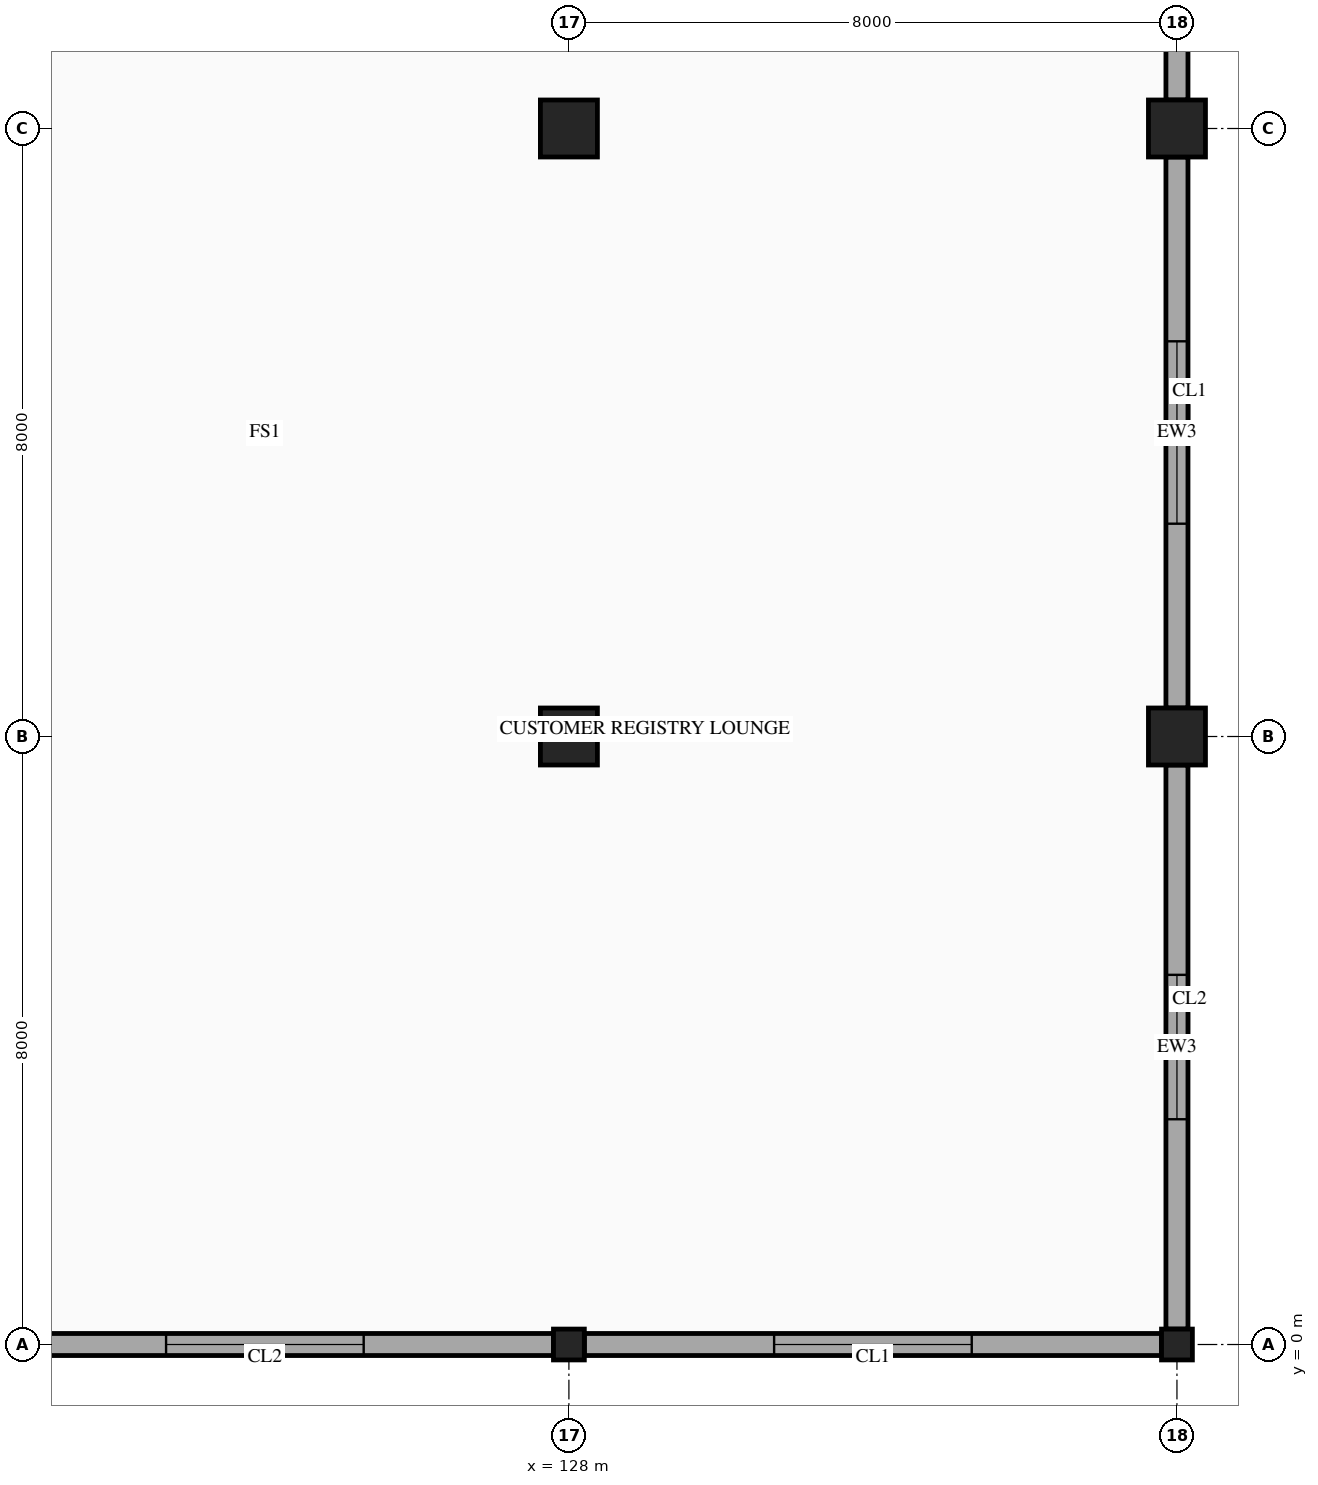
"""IFC4 building model, lengths in metres.
Left out: names, types, materials, properties, quantities, classifications, styles, units other than length and angle.
Written with IfcOpenShell. Run it as: python <this file> out.ifc"""

import sys

from ifc_helpers import new_model, si_unit, direction, frame, frame_2d, origin, origin_2d, place, context, subcontext, project, spatial, rectangle, hollow_rectangle, extrude, element, fill, save


model = new_model("IFC4")
c1 = context("Model", 3, precision=1e-05, world=origin(), true_north=direction((0.0, 1.0)))
c2 = subcontext(c1, "Body", "Model", "MODEL_VIEW")
j1 = project(units=[si_unit("LENGTHUNIT", "METRE"), si_unit("PLANEANGLEUNIT", "RADIAN")], contexts=[c1])
p1 = place(None, origin())
s1 = spatial("IfcSite", under=j1, at=p1, CompositionType="ELEMENT")
p2 = place(p1, origin())
s2 = spatial("IfcBuilding", under=s1, at=p2, CompositionType="ELEMENT")
p3 = place(p2, frame((0.0, 0.0, 23.9)))
s3 = spatial("IfcBuildingStorey", under=s2, at=p3, CompositionType="ELEMENT", Elevation=23.9)
p4 = place(p3, frame((128.0, 0.0, 0.0), z_axis=(0.0, 0.0, 1.0), x_axis=(1.0, 0.0, 0.0)))
e1 = element("IfcColumn", 1, at=p4, inside=s3, PredefinedType="COLUMN", context=c2, shape_type="SweptSolid", body=[
    extrude(hollow_rectangle(XDim=0.406, YDim=0.406, WallThickness=0.015, InnerFilletRadius=0.015, OuterFilletRadius=0.029, at=origin_2d()), origin(), (0.0, 0.0, 1.0), 4.5),
])
for number, where, z_axis, x_axis in (
    (2, (128.0, 8.0, 0.0), (0.0, 0.0, 1.0), (1.0, 0.0, 0.0)),
    (3, (128.0, 16.0, 0.0), (0.0, 0.0, 1.0), (1.0, 0.0, 0.0)),
):
    element("IfcColumn", number, at=place(p3, frame(where, z_axis=z_axis, x_axis=x_axis)), inside=s3, PredefinedType="COLUMN", context=c2, shape_type="SweptSolid", body=[
        extrude(rectangle(XDim=0.75, YDim=0.75, at=origin_2d()), origin(), (0.0, 0.0, 1.0), 4.5),
    ])
p5 = place(p3, frame((136.0, 0.0, 0.0), z_axis=(0.0, 0.0, 1.0), x_axis=(1.0, 0.0, 0.0)))
e4 = element("IfcColumn", 4, at=p5, inside=s3, PredefinedType="COLUMN", context=c2, shape_type="SweptSolid", body=[
    extrude(hollow_rectangle(XDim=0.406, YDim=0.406, WallThickness=0.015, InnerFilletRadius=0.015, OuterFilletRadius=0.029, at=origin_2d()), origin(), (0.0, 0.0, 1.0), 4.5),
])
for number, where, z_axis, x_axis in (
    (5, (136.0, 8.0, 0.0), (0.0, 0.0, 1.0), (1.0, 0.0, 0.0)),
    (6, (136.0, 16.0, 0.0), (0.0, 0.0, 1.0), (1.0, 0.0, 0.0)),
):
    element("IfcColumn", number, at=place(p3, frame(where, z_axis=z_axis, x_axis=x_axis)), inside=s3, PredefinedType="COLUMN", context=c2, shape_type="SweptSolid", body=[
        extrude(rectangle(XDim=0.75, YDim=0.75, at=origin_2d()), origin(), (0.0, 0.0, 1.0), 4.5),
    ])
p6 = place(p3, frame((136.0, 23.675, 0.0), z_axis=(0.0, 0.0, 1.0), x_axis=(0.0, -1.0, 0.0)))
e7 = element("IfcWall", 7, at=p6, inside=s3, PredefinedType="STANDARD", context=c2, shape_type="SweptSolid", body=[
    extrude(rectangle(XDim=7.3, YDim=0.29, at=frame_2d((3.65, 0.0))), origin(), (0.0, 0.0, 1.0), 3.48),
])
p7 = place(p3, frame((136.0, 15.625, 0.0), z_axis=(0.0, 0.0, 1.0), x_axis=(0.0, -1.0, 0.0)))
e8 = element("IfcWall", 8, at=p7, inside=s3, PredefinedType="STANDARD", context=c2, shape_type="SweptSolid", body=[
    extrude(rectangle(XDim=7.25, YDim=0.29, at=frame_2d((3.625, 0.0))), origin(), (0.0, 0.0, 1.0), 3.48),
])
p8 = place(p7, frame((2.425, 0.0, 0.8)))
e9 = element("IfcOpeningElement", 9, at=p8, cuts=e8, PredefinedType="OPENING", context=c2, shape_type="SweptSolid", body=[
    extrude(rectangle(XDim=2.4, YDim=1.8, at=frame_2d((1.2, 0.9))), frame((0.0, 0.155, 0.0), z_axis=(0.0, -1.0, 0.0), x_axis=(1.0, 0.0, 0.0)), (0.0, 0.0, 1.0), 0.31),
])
p9 = place(p3, frame((136.0, 7.625, 0.0), z_axis=(0.0, 0.0, 1.0), x_axis=(0.0, -1.0, 0.0)))
e10 = element("IfcWall", 10, at=p9, inside=s3, PredefinedType="STANDARD", context=c2, shape_type="SweptSolid", body=[
    extrude(rectangle(XDim=7.422, YDim=0.29, at=frame_2d((3.711, 0.0))), origin(), (0.0, 0.0, 1.0), 3.48),
])
p10 = place(p9, frame((2.761, 0.0, 0.8)))
e11 = element("IfcOpeningElement", 11, at=p10, cuts=e10, PredefinedType="OPENING", context=c2, shape_type="SweptSolid", body=[
    extrude(rectangle(XDim=1.9, YDim=1.85, at=frame_2d((0.95, 0.925))), frame((0.0, 0.155, 0.0), z_axis=(0.0, -1.0, 0.0), x_axis=(1.0, 0.0, 0.0)), (0.0, 0.0, 1.0), 0.31),
])
p11 = place(p3, frame((135.797, 0.0, 0.0), z_axis=(0.0, 0.0, 1.0), x_axis=(-1.0, 0.0, 0.0)))
e12 = element("IfcWall", 12, at=p11, inside=s3, PredefinedType="STANDARD", context=c2, shape_type="SweptSolid", body=[
    extrude(rectangle(XDim=7.594, YDim=0.29, at=frame_2d((3.797, 0.0))), origin(), (0.0, 0.0, 1.0), 3.48),
])
p12 = place(p11, frame((2.497, 0.0, 0.8)))
e13 = element("IfcOpeningElement", 13, at=p12, cuts=e12, PredefinedType="OPENING", context=c2, shape_type="SweptSolid", body=[
    extrude(rectangle(XDim=2.6, YDim=1.3, at=frame_2d((1.3, 0.65))), frame((0.0, 0.155, 0.0), z_axis=(0.0, -1.0, 0.0), x_axis=(1.0, 0.0, 0.0)), (0.0, 0.0, 1.0), 0.31),
])
p13 = place(p3, frame((127.797, 0.0, 0.0), z_axis=(0.0, 0.0, 1.0), x_axis=(-1.0, 0.0, 0.0)))
e14 = element("IfcWall", 14, at=p13, inside=s3, PredefinedType="STANDARD", context=c2, shape_type="SweptSolid", body=[
    extrude(rectangle(XDim=7.594, YDim=0.29, at=frame_2d((3.797, 0.0))), origin(), (0.0, 0.0, 1.0), 3.48),
])
p14 = place(p13, frame((2.497, 0.0, 0.8)))
e15 = element("IfcOpeningElement", 15, at=p14, cuts=e14, PredefinedType="OPENING", context=c2, shape_type="SweptSolid", body=[
    extrude(rectangle(XDim=2.6, YDim=1.3, at=frame_2d((1.3, 0.65))), frame((0.0, 0.155, 0.0), z_axis=(0.0, -1.0, 0.0), x_axis=(1.0, 0.0, 0.0)), (0.0, 0.0, 1.0), 0.31),
])
p15 = place(p8, origin())
e16 = element("IfcWindow", 16, at=p15, inside=s3, PartitioningType="DOUBLE_PANEL_VERTICAL", PredefinedType="WINDOW", context=c2, shape_type="SweptSolid", body=[
    extrude(rectangle(XDim=2.4, YDim=1.8, at=frame_2d((1.2, 0.9))), frame((0.0, 0.03, 0.0), z_axis=(0.0, -1.0, 0.0), x_axis=(1.0, 0.0, 0.0)), (0.0, 0.0, 1.0), 0.06),
])
fill(e9, e16)
p16 = place(p10, origin())
e17 = element("IfcWindow", 17, at=p16, inside=s3, PartitioningType="SINGLE_PANEL", PredefinedType="WINDOW", context=c2, shape_type="SweptSolid", body=[
    extrude(rectangle(XDim=1.9, YDim=1.85, at=frame_2d((0.95, 0.925))), frame((0.0, 0.03, 0.0), z_axis=(0.0, -1.0, 0.0), x_axis=(1.0, 0.0, 0.0)), (0.0, 0.0, 1.0), 0.06),
])
fill(e11, e17)
p17 = place(p12, origin())
e18 = element("IfcWindow", 18, at=p17, inside=s3, PartitioningType="DOUBLE_PANEL_VERTICAL", PredefinedType="WINDOW", context=c2, shape_type="SweptSolid", body=[
    extrude(rectangle(XDim=2.6, YDim=1.3, at=frame_2d((1.3, 0.65))), frame((0.0, 0.03, 0.0), z_axis=(0.0, -1.0, 0.0), x_axis=(1.0, 0.0, 0.0)), (0.0, 0.0, 1.0), 0.06),
])
fill(e13, e18)
p18 = place(p14, origin())
e19 = element("IfcWindow", 19, at=p18, inside=s3, PartitioningType="DOUBLE_PANEL_VERTICAL", PredefinedType="WINDOW", context=c2, shape_type="SweptSolid", body=[
    extrude(rectangle(XDim=2.6, YDim=1.3, at=frame_2d((1.3, 0.65))), frame((0.0, 0.03, 0.0), z_axis=(0.0, -1.0, 0.0), x_axis=(1.0, 0.0, 0.0)), (0.0, 0.0, 1.0), 0.06),
])
fill(e15, e19)
save(model, sys.argv[1])
